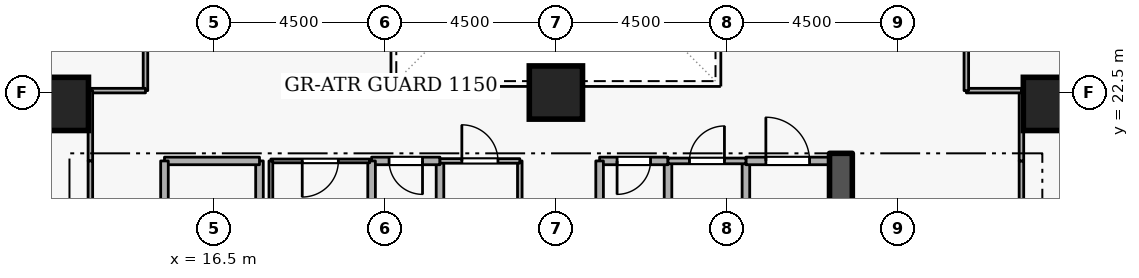
"""IFC4 building model, lengths in metres.
Left out: names, types, materials, properties, quantities, classifications, styles, units other than length and angle.
Written with IfcOpenShell. Run it as: python <this file> out.ifc"""

import sys

from ifc_helpers import new_model, si_unit, direction, frame, frame_2d, origin, origin_2d, place, context, subcontext, project, spatial, rectangle, extrude, element, fill, save


model = new_model("IFC4")
c1 = context("Model", 3, precision=1e-05, world=origin(), true_north=direction((0.0, 1.0)))
c2 = subcontext(c1, "Body", "Model", "MODEL_VIEW")
j1 = project(units=[si_unit("LENGTHUNIT", "METRE"), si_unit("PLANEANGLEUNIT", "RADIAN")], contexts=[c1])
p1 = place(None, origin())
s1 = spatial("IfcSite", under=j1, at=p1, CompositionType="ELEMENT")
p2 = place(p1, origin())
s2 = spatial("IfcBuilding", under=s1, at=p2, CompositionType="ELEMENT")
p3 = place(p2, frame((0.0, 0.0, 57.3)))
s3 = spatial("IfcBuildingStorey", under=s2, at=p3, CompositionType="ELEMENT", Elevation=57.3)
p4 = place(p3, frame((33.0, 15.2, 0.0), z_axis=(0.0, 0.0, 1.0), x_axis=(0.0, 1.0, 0.0)))
e1 = element("IfcWall", 1, at=p4, inside=s3, PredefinedType="SHEAR", context=c2, shape_type="SweptSolid", body=[
    extrude(rectangle(XDim=5.7, YDim=0.6, at=frame_2d((2.85, 0.0))), origin(), (0.0, 0.0, 1.0), 3.6),
])
for number, where, z_axis, x_axis in (
    (2, (12.5, 22.2, 0.0), (0.0, 0.0, 1.0), (1.0, 0.0, 0.0)),
    (3, (38.5, 22.2, 0.0), (0.0, 0.0, 1.0), (1.0, 0.0, 0.0)),
    (4, (25.5, 22.5, 0.0), (0.0, 0.0, 1.0), (1.0, 0.0, 0.0)),
):
    element("IfcColumn", number, at=place(p3, frame(where, z_axis=z_axis, x_axis=x_axis)), inside=s3, PredefinedType="COLUMN", context=c2, shape_type="SweptSolid", body=[
        extrude(rectangle(XDim=1.4, YDim=1.4, at=origin_2d()), origin(), (0.0, 0.0, 1.0), 3.6),
    ])
p5 = place(p3, frame((17.7, 18.4, 0.0), z_axis=(0.0, 0.0, 1.0), x_axis=(0.0, 1.0, 0.0)))
e5 = element("IfcWall", 5, at=p5, inside=s3, PredefinedType="STANDARD", context=c2, shape_type="SweptSolid", body=[
    extrude(rectangle(XDim=2.3, YDim=0.2, at=frame_2d((1.15, 0.0))), origin(), (0.0, 0.0, 1.0), 2.545),
])
p6 = place(p3, frame((17.7, 20.7, 0.0), z_axis=(0.0, 0.0, 1.0), x_axis=(-1.0, 0.0, 0.0)))
e6 = element("IfcWall", 6, at=p6, inside=s3, PredefinedType="STANDARD", context=c2, shape_type="SweptSolid", body=[
    extrude(rectangle(XDim=2.5, YDim=0.2, at=frame_2d((1.25, 0.0))), origin(), (0.0, 0.0, 1.0), 3.34),
])
p7 = place(p3, frame((15.2, 20.7, 0.0), z_axis=(0.0, 0.0, 1.0), x_axis=(0.0, -1.0, 0.0)))
e7 = element("IfcWall", 7, at=p7, inside=s3, PredefinedType="STANDARD", context=c2, shape_type="SweptSolid", body=[
    extrude(rectangle(XDim=5.7, YDim=0.2, at=frame_2d((2.85, 0.0))), origin(), (0.0, 0.0, 1.0), 3.34),
])
p8 = place(p7, frame((2.275, 0.0, 0.0)))
e8 = element("IfcOpeningElement", 8, at=p8, cuts=e7, PredefinedType="OPENING", context=c2, shape_type="SweptSolid", body=[
    extrude(rectangle(XDim=1.15, YDim=2.1, at=frame_2d((0.575, 1.05))), frame((0.0, 0.11, 0.0), z_axis=(0.0, -1.0, 0.0), x_axis=(1.0, 0.0, 0.0)), (0.0, 0.0, 1.0), 0.22),
])
p9 = place(p3, frame((28.45, 18.65, 0.0), z_axis=(0.0, 0.0, 1.0), x_axis=(0.0, 1.0, 0.0)))
e9 = element("IfcWall", 9, at=p9, inside=s3, PredefinedType="STANDARD", context=c2, shape_type="SweptSolid", body=[
    extrude(rectangle(XDim=2.05, YDim=0.2, at=frame_2d((1.025, 0.0))), origin(), (0.0, 0.0, 1.0), 3.34),
])
p10 = place(p3, frame((28.45, 20.7, 0.0), z_axis=(0.0, 0.0, 1.0), x_axis=(-1.0, 0.0, 0.0)))
e10 = element("IfcWall", 10, at=p10, inside=s3, PredefinedType="STANDARD", context=c2, shape_type="SweptSolid", body=[
    extrude(rectangle(XDim=1.8, YDim=0.2, at=frame_2d((0.9, 0.0))), origin(), (0.0, 0.0, 1.0), 3.34),
])
p11 = place(p10, frame((0.46, 0.0, 0.0)))
e11 = element("IfcOpeningElement", 11, at=p11, cuts=e10, PredefinedType="OPENING", context=c2, shape_type="SweptSolid", body=[
    extrude(rectangle(XDim=0.88, YDim=2.04, at=frame_2d((0.44, 1.02))), frame((0.0, 0.11, 0.0), z_axis=(0.0, -1.0, 0.0), x_axis=(1.0, 0.0, 0.0)), (0.0, 0.0, 1.0), 0.22),
])
for number, where, z_axis, x_axis in (
    (12, (26.65, 20.7, 0.0), (0.0, 0.0, 1.0), (0.0, -1.0, 0.0)),
    (13, (22.45, 18.65, 0.0), (0.0, 0.0, 1.0), (0.0, 1.0, 0.0)),
):
    element("IfcWall", number, at=place(p3, frame(where, z_axis=z_axis, x_axis=x_axis)), inside=s3, PredefinedType="STANDARD", context=c2, shape_type="SweptSolid", body=[
        extrude(rectangle(XDim=2.05, YDim=0.2, at=frame_2d((1.025, 0.0))), origin(), (0.0, 0.0, 1.0), 3.34),
    ])
p12 = place(p3, frame((22.45, 20.7, 0.0), z_axis=(0.0, 0.0, 1.0), x_axis=(-1.0, 0.0, 0.0)))
e14 = element("IfcWall", 14, at=p12, inside=s3, PredefinedType="STANDARD", context=c2, shape_type="SweptSolid", body=[
    extrude(rectangle(XDim=1.8, YDim=0.2, at=frame_2d((0.9, 0.0))), origin(), (0.0, 0.0, 1.0), 3.34),
])
p13 = place(p12, frame((0.46, 0.0, 0.0)))
e15 = element("IfcOpeningElement", 15, at=p13, cuts=e14, PredefinedType="OPENING", context=c2, shape_type="SweptSolid", body=[
    extrude(rectangle(XDim=0.88, YDim=2.04, at=frame_2d((0.44, 1.02))), frame((0.0, 0.11, 0.0), z_axis=(0.0, -1.0, 0.0), x_axis=(1.0, 0.0, 0.0)), (0.0, 0.0, 1.0), 0.22),
])
for number, where, z_axis, x_axis in (
    (16, (20.65, 20.7, 0.0), (0.0, 0.0, 1.0), (0.0, -1.0, 0.0)),
    (17, (30.5, 18.65, 0.0), (0.0, 0.0, 1.0), (0.0, 1.0, 0.0)),
):
    element("IfcWall", number, at=place(p3, frame(where, z_axis=z_axis, x_axis=x_axis)), inside=s3, PredefinedType="STANDARD", context=c2, shape_type="SweptSolid", body=[
        extrude(rectangle(XDim=2.05, YDim=0.2, at=frame_2d((1.025, 0.0))), origin(), (0.0, 0.0, 1.0), 3.34),
    ])
p14 = place(p3, frame((30.5, 20.7, 0.0), z_axis=(0.0, 0.0, 1.0), x_axis=(1.0, 0.0, 0.0)))
e18 = element("IfcWall", 18, at=p14, inside=s3, PredefinedType="STANDARD", context=c2, shape_type="SweptSolid", body=[
    extrude(rectangle(XDim=2.2, YDim=0.2, at=frame_2d((1.1, 0.0))), origin(), (0.0, 0.0, 1.0), 3.34),
])
p15 = place(p14, frame((0.525, 0.0, 0.0)))
e19 = element("IfcOpeningElement", 19, at=p15, cuts=e18, PredefinedType="OPENING", context=c2, shape_type="SweptSolid", body=[
    extrude(rectangle(XDim=1.15, YDim=2.1, at=frame_2d((0.575, 1.05))), frame((0.0, 0.11, 0.0), z_axis=(0.0, -1.0, 0.0), x_axis=(1.0, 0.0, 0.0)), (0.0, 0.0, 1.0), 0.22),
])
p16 = place(p3, frame((20.6, 20.7, 0.0), z_axis=(0.0, 0.0, 1.0), x_axis=(-1.0, 0.0, 0.0)))
e20 = element("IfcWall", 20, at=p16, inside=s3, PredefinedType="PARTITIONING", context=c2, shape_type="SweptSolid", body=[
    extrude(rectangle(XDim=2.6, YDim=0.1, at=frame_2d((1.3, 0.0))), origin(), (0.0, 0.0, 1.0), 3.34),
])
p17 = place(p16, frame((0.825, 0.0, 0.0)))
e21 = element("IfcOpeningElement", 21, at=p17, cuts=e20, PredefinedType="OPENING", context=c2, shape_type="SweptSolid", body=[
    extrude(rectangle(XDim=0.95, YDim=2.1, at=frame_2d((0.475, 1.05))), frame((0.0, 0.06, 0.0), z_axis=(0.0, -1.0, 0.0), x_axis=(1.0, 0.0, 0.0)), (0.0, 0.0, 1.0), 0.12),
])
p18 = place(p3, frame((18.0, 20.7, 0.0), z_axis=(0.0, 0.0, 1.0), x_axis=(0.0, -1.0, 0.0)))
e22 = element("IfcWall", 22, at=p18, inside=s3, PredefinedType="PARTITIONING", context=c2, shape_type="SweptSolid", body=[
    extrude(rectangle(XDim=2.05, YDim=0.1, at=frame_2d((1.025, 0.0))), origin(), (0.0, 0.0, 1.0), 2.545),
])
p19 = place(p3, frame((24.55, 20.7, 0.0), z_axis=(0.0, 0.0, 1.0), x_axis=(0.0, -1.0, 0.0)))
e23 = element("IfcWall", 23, at=p19, inside=s3, PredefinedType="PARTITIONING", context=c2, shape_type="SweptSolid", body=[
    extrude(rectangle(XDim=2.05, YDim=0.12, at=frame_2d((1.025, 0.0))), origin(), (0.0, 0.0, 1.0), 3.34),
])
p20 = place(p3, frame((22.45, 20.7, 0.0), z_axis=(0.0, 0.0, 1.0), x_axis=(1.0, 0.0, 0.0)))
e24 = element("IfcWall", 24, at=p20, inside=s3, PredefinedType="PARTITIONING", context=c2, shape_type="SweptSolid", body=[
    extrude(rectangle(XDim=2.1, YDim=0.12, at=frame_2d((1.05, 0.0))), origin(), (0.0, 0.0, 1.0), 3.34),
])
p21 = place(p20, frame((0.575, 0.0, 0.0)))
e25 = element("IfcOpeningElement", 25, at=p21, cuts=e24, PredefinedType="OPENING", context=c2, shape_type="SweptSolid", body=[
    extrude(rectangle(XDim=0.95, YDim=2.1, at=frame_2d((0.475, 1.05))), frame((0.0, 0.07, 0.0), z_axis=(0.0, -1.0, 0.0), x_axis=(1.0, 0.0, 0.0)), (0.0, 0.0, 1.0), 0.14),
])
p22 = place(p3, frame((28.45, 20.7, 0.0), z_axis=(0.0, 0.0, 1.0), x_axis=(1.0, 0.0, 0.0)))
e26 = element("IfcWall", 26, at=p22, inside=s3, PredefinedType="PARTITIONING", context=c2, shape_type="SweptSolid", body=[
    extrude(rectangle(XDim=2.05, YDim=0.15, at=frame_2d((1.025, 0.0))), origin(), (0.0, 0.0, 1.0), 3.34),
])
p23 = place(p22, frame((0.565, 0.0, 0.0)))
e27 = element("IfcOpeningElement", 27, at=p23, cuts=e26, PredefinedType="OPENING", context=c2, shape_type="SweptSolid", body=[
    extrude(rectangle(XDim=0.92, YDim=2.08, at=frame_2d((0.46, 1.04))), frame((0.0, 0.085, 0.0), z_axis=(0.0, -1.0, 0.0), x_axis=(1.0, 0.0, 0.0)), (0.0, 0.0, 1.0), 0.17),
])
p24 = place(p3, frame((14.7, 27.0, 0.0), z_axis=(0.0, 0.0, 1.0), x_axis=(0.0, -1.0, 0.0)))
e28 = element("IfcWall", 28, at=p24, inside=s3, PredefinedType="PARTITIONING", context=c2, shape_type="SweptSolid", body=[
    extrude(rectangle(XDim=4.45, YDim=0.12, at=frame_2d((2.225, 0.0))), origin(), (0.0, 0.0, 1.0), 3.34),
])
p25 = place(p3, frame((14.7, 22.55, 0.0), z_axis=(0.0, 0.0, 1.0), x_axis=(-1.0, 0.0, 0.0)))
e29 = element("IfcWall", 29, at=p25, inside=s3, PredefinedType="PARTITIONING", context=c2, shape_type="SweptSolid", body=[
    extrude(rectangle(XDim=1.45, YDim=0.12, at=frame_2d((0.725, 0.0))), origin(), (0.0, 0.0, 1.0), 3.34),
])
p26 = place(p3, frame((13.25, 22.55, 0.0), z_axis=(0.0, 0.0, 1.0), x_axis=(0.0, -1.0, 0.0)))
e30 = element("IfcWall", 30, at=p26, inside=s3, PredefinedType="PARTITIONING", context=c2, shape_type="SweptSolid", body=[
    extrude(rectangle(XDim=1.85, YDim=0.12, at=frame_2d((0.925, 0.0))), origin(), (0.0, 0.0, 1.0), 3.34),
])
p27 = place(p3, frame((13.25, 20.7, 0.0), z_axis=(0.0, 0.0, 1.0), x_axis=(0.0, -1.0, 0.0)))
e31 = element("IfcWall", 31, at=p27, inside=s3, PredefinedType="PARTITIONING", context=c2, shape_type="SweptSolid", body=[
    extrude(rectangle(XDim=9.35, YDim=0.12, at=frame_2d((4.675, 0.0))), origin(), (0.0, 0.0, 1.0), 3.34),
])
p28 = place(p27, frame((4.15, 0.0, 0.0)))
e32 = element("IfcOpeningElement", 32, at=p28, cuts=e31, PredefinedType="OPENING", context=c2, shape_type="SweptSolid", body=[
    extrude(rectangle(XDim=1.05, YDim=2.1, at=frame_2d((0.525, 1.05))), frame((0.0, 0.07, 0.0), z_axis=(0.0, -1.0, 0.0), x_axis=(1.0, 0.0, 0.0)), (0.0, 0.0, 1.0), 0.14),
])
p29 = place(p3, frame((37.75, 17.55, 0.0), z_axis=(0.0, 0.0, 1.0), x_axis=(0.0, 1.0, 0.0)))
e33 = element("IfcWall", 33, at=p29, inside=s3, PredefinedType="PARTITIONING", context=c2, shape_type="SweptSolid", body=[
    extrude(rectangle(XDim=3.15, YDim=0.12, at=frame_2d((1.575, 0.0))), origin(), (0.0, 0.0, 1.0), 3.34),
])
p30 = place(p3, frame((37.75, 20.7, 0.0), z_axis=(0.0, 0.0, 1.0), x_axis=(0.0, 1.0, 0.0)))
e34 = element("IfcWall", 34, at=p30, inside=s3, PredefinedType="PARTITIONING", context=c2, shape_type="SweptSolid", body=[
    extrude(rectangle(XDim=1.85, YDim=0.12, at=frame_2d((0.925, 0.0))), origin(), (0.0, 0.0, 1.0), 3.34),
])
p31 = place(p3, frame((37.75, 22.55, 0.0), z_axis=(0.0, 0.0, 1.0), x_axis=(-1.0, 0.0, 0.0)))
e35 = element("IfcWall", 35, at=p31, inside=s3, PredefinedType="PARTITIONING", context=c2, shape_type="SweptSolid", body=[
    extrude(rectangle(XDim=1.45, YDim=0.12, at=frame_2d((0.725, 0.0))), origin(), (0.0, 0.0, 1.0), 3.34),
])
p32 = place(p3, frame((36.3, 22.55, 0.0), z_axis=(0.0, 0.0, 1.0), x_axis=(0.0, 1.0, 0.0)))
e36 = element("IfcWall", 36, at=p32, inside=s3, PredefinedType="PARTITIONING", context=c2, shape_type="SweptSolid", body=[
    extrude(rectangle(XDim=4.45, YDim=0.12, at=frame_2d((2.225, 0.0))), origin(), (0.0, 0.0, 1.0), 3.34),
])
p33 = place(p32, frame((1.7, 0.0, 0.0)))
e37 = element("IfcOpeningElement", 37, at=p33, cuts=e36, PredefinedType="OPENING", context=c2, shape_type="SweptSolid", body=[
    extrude(rectangle(XDim=1.05, YDim=2.1, at=frame_2d((0.525, 1.05))), frame((0.0, 0.07, 0.0), z_axis=(0.0, -1.0, 0.0), x_axis=(1.0, 0.0, 0.0)), (0.0, 0.0, 1.0), 0.14),
])
p34 = place(p11, origin())
e38 = element("IfcDoor", 38, at=p34, inside=s3, OperationType="SINGLE_SWING_RIGHT", PredefinedType="DOOR", context=c2, shape_type="SweptSolid", body=[
    extrude(rectangle(XDim=0.88, YDim=2.04, at=frame_2d((0.44, 1.02))), frame((0.0, 0.025, 0.0), z_axis=(0.0, -1.0, 0.0), x_axis=(1.0, 0.0, 0.0)), (0.0, 0.0, 1.0), 0.05),
])
fill(e11, e38)
p35 = place(p13, origin())
e39 = element("IfcDoor", 39, at=p35, inside=s3, OperationType="SINGLE_SWING_LEFT", PredefinedType="DOOR", context=c2, shape_type="SweptSolid", body=[
    extrude(rectangle(XDim=0.88, YDim=2.04, at=frame_2d((0.44, 1.02))), frame((0.0, 0.025, 0.0), z_axis=(0.0, -1.0, 0.0), x_axis=(1.0, 0.0, 0.0)), (0.0, 0.0, 1.0), 0.05),
])
fill(e15, e39)
p36 = place(p17, origin())
e40 = element("IfcDoor", 40, at=p36, inside=s3, OperationType="SINGLE_SWING_RIGHT", PredefinedType="DOOR", context=c2, shape_type="SweptSolid", body=[
    extrude(rectangle(XDim=0.95, YDim=2.1, at=frame_2d((0.475, 1.05))), frame((0.0, 0.025, 0.0), z_axis=(0.0, -1.0, 0.0), x_axis=(1.0, 0.0, 0.0)), (0.0, 0.0, 1.0), 0.05),
])
fill(e21, e40)
p37 = place(p21, origin())
e41 = element("IfcDoor", 41, at=p37, inside=s3, OperationType="SINGLE_SWING_LEFT", PredefinedType="DOOR", context=c2, shape_type="SweptSolid", body=[
    extrude(rectangle(XDim=0.95, YDim=2.1, at=frame_2d((0.475, 1.05))), frame((0.0, 0.025, 0.0), z_axis=(0.0, -1.0, 0.0), x_axis=(1.0, 0.0, 0.0)), (0.0, 0.0, 1.0), 0.05),
])
fill(e25, e41)
p38 = place(p23, origin())
e42 = element("IfcDoor", 42, at=p38, inside=s3, OperationType="SINGLE_SWING_RIGHT", PredefinedType="DOOR", context=c2, shape_type="SweptSolid", body=[
    extrude(rectangle(XDim=0.92, YDim=2.08, at=frame_2d((0.46, 1.04))), frame((0.0, 0.025, 0.0), z_axis=(0.0, -1.0, 0.0), x_axis=(1.0, 0.0, 0.0)), (0.0, 0.0, 1.0), 0.05),
])
fill(e27, e42)
p39 = place(p15, origin())
e43 = element("IfcDoor", 43, at=p39, inside=s3, OperationType="SINGLE_SWING_LEFT", PredefinedType="DOOR", context=c2, shape_type="SweptSolid", body=[
    extrude(rectangle(XDim=1.15, YDim=2.1, at=frame_2d((0.575, 1.05))), frame((0.0, 0.025, 0.0), z_axis=(0.0, -1.0, 0.0), x_axis=(1.0, 0.0, 0.0)), (0.0, 0.0, 1.0), 0.05),
])
fill(e19, e43)
save(model, sys.argv[1])
